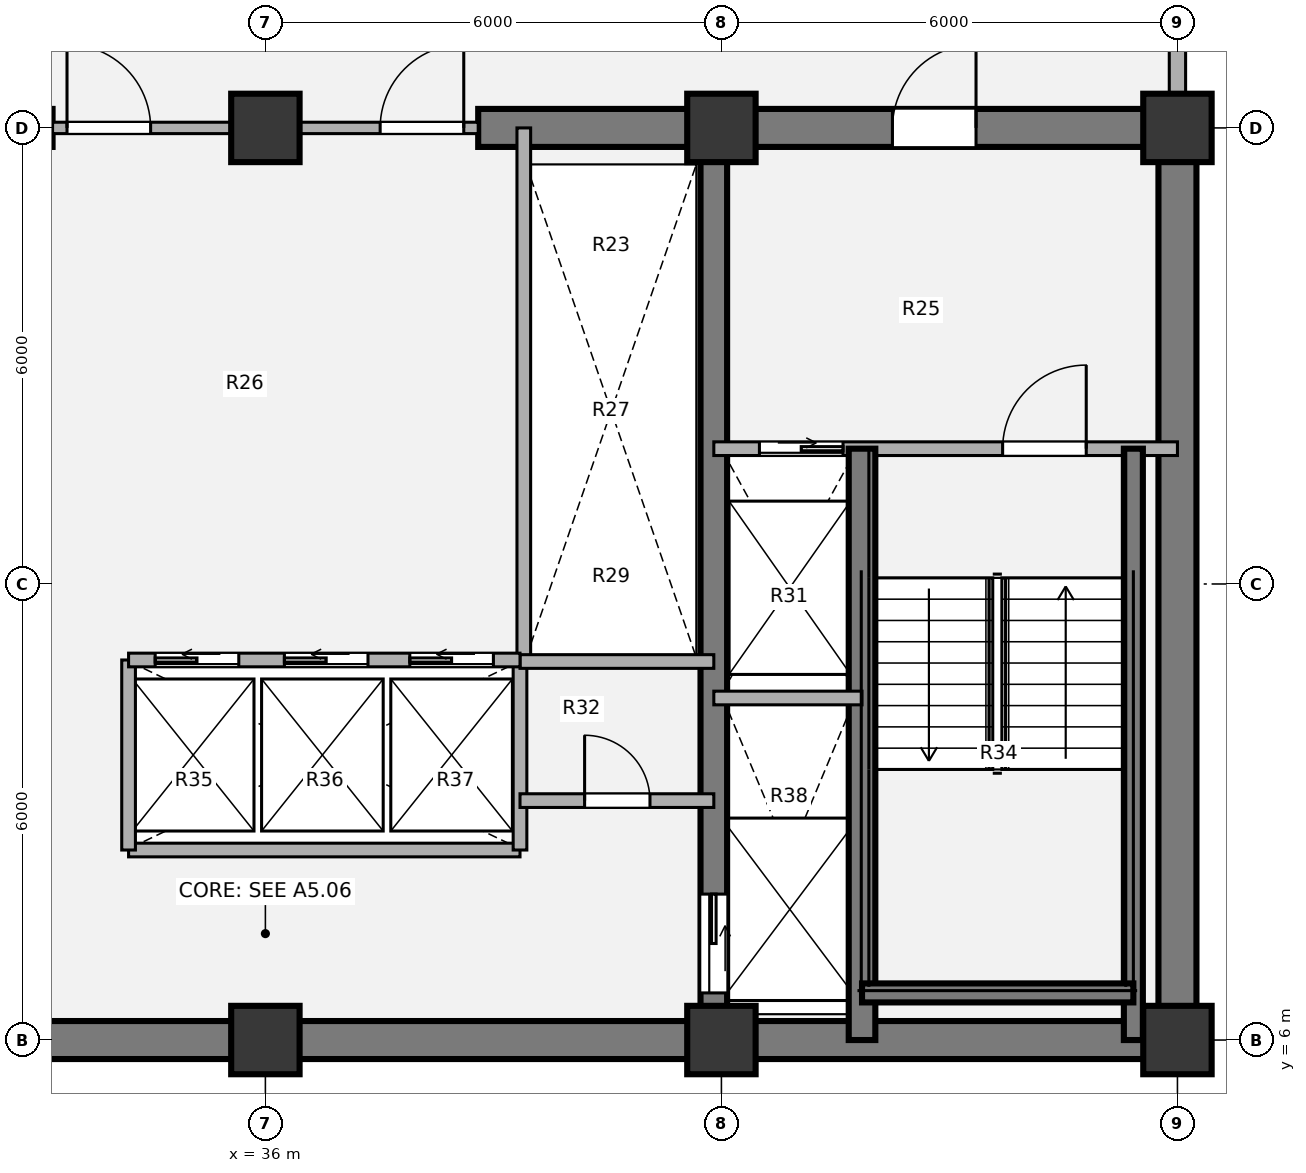
"""IFC4 building model, lengths in metres.
Left out: names, types, materials, properties, quantities, classifications, styles, units other than length and angle.
Written with IfcOpenShell. Run it as: python <this file> out.ifc"""

import sys

from ifc_helpers import new_model, si_unit, direction, frame, frame_2d, origin, origin_2d, place, context, subcontext, project, spatial, rectangle, extrude, source, transform, mapped, element, fill, save


model = new_model("IFC4")
c1 = context("Model", 3, precision=1e-05, world=origin(), true_north=direction((0.0, 1.0)))
c2 = subcontext(c1, "Body", "Model", "MODEL_VIEW")
j1 = project(units=[si_unit("LENGTHUNIT", "METRE"), si_unit("PLANEANGLEUNIT", "RADIAN")], contexts=[c1])
p1 = place(None, origin())
s1 = spatial("IfcSite", under=j1, at=p1, CompositionType="ELEMENT")
p2 = place(p1, origin())
s2 = spatial("IfcBuilding", under=s1, at=p2, CompositionType="ELEMENT")
p3 = place(p2, frame((0.0, 0.0, 97.38)))
s3 = spatial("IfcBuildingStorey", under=s2, at=p3, CompositionType="ELEMENT", Elevation=97.38)
m1 = source(origin(), c2, "Body", "SweptSolid", [
    extrude(rectangle(XDim=0.9, YDim=0.9, at=origin_2d()), origin(), (0.0, 0.0, 1.0), 3.78),
])
for number, where, z_axis, x_axis in (
    (1, (36.0, 6.0, 0.0), (0.0, 0.0, 1.0), (1.0, 0.0, 0.0)),
    (2, (42.0, 6.0, 0.0), (0.0, 0.0, 1.0), (1.0, 0.0, 0.0)),
    (3, (48.0, 6.0, 0.0), (0.0, 0.0, 1.0), (1.0, 0.0, 0.0)),
    (4, (36.0, 18.0, 0.0), (0.0, 0.0, 1.0), (1.0, 0.0, 0.0)),
    (5, (42.0, 18.0, 0.0), (0.0, 0.0, 1.0), (1.0, 0.0, 0.0)),
    (6, (48.0, 18.0, 0.0), (0.0, 0.0, 1.0), (1.0, 0.0, 0.0)),
):
    element("IfcColumn", number, at=place(p3, frame(where, z_axis=z_axis, x_axis=x_axis)), inside=s3, PredefinedType="COLUMN", context=c2, shape_type="MappedRepresentation", body=[
        mapped(m1, transform((0.0, 0.0, 0.0), x_axis=(1.0, 0.0, 0.0), y_axis=(0.0, 1.0, 0.0), z_axis=(0.0, 0.0, 1.0), scale=1.0)),
    ])
p4 = place(p3, frame((48.25, 6.0, 0.0), z_axis=(0.0, 0.0, 1.0), x_axis=(-1.0, 0.0, 0.0)))
e7 = element("IfcWall", 7, at=p4, inside=s3, PredefinedType="SHEAR", context=c2, shape_type="SweptSolid", body=[
    extrude(rectangle(XDim=24.5, YDim=0.5, at=frame_2d((12.25, 0.0))), origin(), (0.0, 0.0, 1.0), 3.78),
])
p5 = place(p3, frame((48.0, 18.0, 0.0), z_axis=(0.0, 0.0, 1.0), x_axis=(0.0, -1.0, 0.0)))
e8 = element("IfcWall", 8, at=p5, inside=s3, PredefinedType="SHEAR", context=c2, shape_type="SweptSolid", body=[
    extrude(rectangle(XDim=12.0, YDim=0.5, at=frame_2d((6.0, 0.0))), origin(), (0.0, 0.0, 1.0), 3.78),
])
p6 = place(p3, frame((23.75, 18.0, 0.0), z_axis=(0.0, 0.0, 1.0), x_axis=(1.0, 0.0, 0.0)))
e9 = element("IfcWall", 9, at=p6, inside=s3, PredefinedType="SHEAR", context=c2, shape_type="SweptSolid", body=[
    extrude(rectangle(XDim=9.45, YDim=0.5, at=frame_2d((4.725, 0.0))), origin(), (0.0, 0.0, 1.0), 3.78),
])
p7 = place(p6, frame((2.95, 0.0, 0.0)))
e10 = element("IfcOpeningElement", 10, at=p7, cuts=e9, PredefinedType="OPENING", context=c2, shape_type="SweptSolid", body=[
    extrude(rectangle(XDim=1.1, YDim=2.1, at=origin_2d()), frame((0.55, 0.26, 1.05), z_axis=(0.0, -1.0, 0.0), x_axis=(1.0, 0.0, 0.0)), (0.0, 0.0, 1.0), 0.52),
])
p8 = place(p3, frame((38.8, 18.0, 0.0), z_axis=(0.0, 0.0, 1.0), x_axis=(1.0, 0.0, 0.0)))
e11 = element("IfcWall", 11, at=p8, inside=s3, PredefinedType="SHEAR", context=c2, shape_type="SweptSolid", body=[
    extrude(rectangle(XDim=9.45, YDim=0.5, at=frame_2d((4.725, 0.0))), origin(), (0.0, 0.0, 1.0), 3.78),
])
p9 = place(p8, frame((5.45, 0.0, 0.0)))
e12 = element("IfcOpeningElement", 12, at=p9, cuts=e11, PredefinedType="OPENING", context=c2, shape_type="SweptSolid", body=[
    extrude(rectangle(XDim=1.1, YDim=2.1, at=origin_2d()), frame((0.55, 0.26, 1.05), z_axis=(0.0, -1.0, 0.0), x_axis=(1.0, 0.0, 0.0)), (0.0, 0.0, 1.0), 0.52),
])
p10 = place(p3, frame((41.9, 18.0, 0.0), z_axis=(0.0, 0.0, 1.0), x_axis=(0.0, -1.0, 0.0)))
e13 = element("IfcWall", 13, at=p10, inside=s3, PredefinedType="SHEAR", context=c2, shape_type="SweptSolid", body=[
    extrude(rectangle(XDim=12.0, YDim=0.35, at=frame_2d((6.0, 0.0))), origin(), (0.0, 0.0, 1.0), 3.78),
])
p11 = place(p10, frame((10.08, 0.0, 0.0)))
e14 = element("IfcOpeningElement", 14, at=p11, cuts=e13, PredefinedType="OPENING", context=c2, shape_type="SweptSolid", body=[
    extrude(rectangle(XDim=1.3, YDim=2.1, at=origin_2d()), frame((0.65, 0.185, 1.05), z_axis=(0.0, -1.0, 0.0), x_axis=(1.0, 0.0, 0.0)), (0.0, 0.0, 1.0), 0.37),
])
p12 = place(p3, frame((48.0, 21.05, 0.0), z_axis=(0.0, 0.0, 1.0), x_axis=(0.0, -1.0, 0.0)))
e15 = element("IfcWall", 15, at=p12, inside=s3, PredefinedType="SOLIDWALL", context=c2, shape_type="SweptSolid", body=[
    extrude(rectangle(XDim=2.62, YDim=0.215, at=frame_2d((1.31, 0.0))), origin(), (0.0, 0.0, 1.0), 3.53),
])
p13 = place(p3, frame((34.2, 8.5, 0.0), z_axis=(0.0, 0.0, 1.0), x_axis=(1.0, 0.0, 0.0)))
e16 = element("IfcWall", 16, at=p13, inside=s3, PredefinedType="PARTITIONING", context=c2, shape_type="SweptSolid", body=[
    extrude(rectangle(XDim=5.15, YDim=0.18, at=frame_2d((2.575, 0.0))), origin(), (0.0, 0.0, 1.0), 3.5),
])
for number, where, z_axis, x_axis in (
    (17, (34.2, 8.5, 0.0), (0.0, 0.0, 1.0), (0.0, 1.0, 0.0)),
    (18, (39.35, 8.5, 0.0), (0.0, 0.0, 1.0), (0.0, 1.0, 0.0)),
):
    element("IfcWall", number, at=place(p3, frame(where, z_axis=z_axis, x_axis=x_axis)), inside=s3, PredefinedType="PARTITIONING", context=c2, shape_type="SweptSolid", body=[
        extrude(rectangle(XDim=2.5, YDim=0.18, at=frame_2d((1.25, 0.0))), origin(), (0.0, 0.0, 1.0), 3.5),
    ])
p14 = place(p3, frame((39.4, 11.0, 0.0), z_axis=(0.0, 0.0, 1.0), x_axis=(0.0, 1.0, 0.0)))
e19 = element("IfcWall", 19, at=p14, inside=s3, PredefinedType="PARTITIONING", context=c2, shape_type="SweptSolid", body=[
    extrude(rectangle(XDim=7.0, YDim=0.18, at=frame_2d((3.5, 0.0))), origin(), (0.0, 0.0, 1.0), 3.5),
])
p15 = place(p3, frame((39.35, 10.98, 0.0), z_axis=(0.0, 0.0, 1.0), x_axis=(1.0, 0.0, 0.0)))
e20 = element("IfcWall", 20, at=p15, inside=s3, PredefinedType="PARTITIONING", context=c2, shape_type="SweptSolid", body=[
    extrude(rectangle(XDim=2.55, YDim=0.18, at=frame_2d((1.275, 0.0))), origin(), (0.0, 0.0, 1.0), 3.5),
])
p16 = place(p3, frame((39.35, 9.15, 0.0), z_axis=(0.0, 0.0, 1.0), x_axis=(1.0, 0.0, 0.0)))
e21 = element("IfcWall", 21, at=p16, inside=s3, PredefinedType="PARTITIONING", context=c2, shape_type="SweptSolid", body=[
    extrude(rectangle(XDim=2.55, YDim=0.18, at=frame_2d((1.275, 0.0))), origin(), (0.0, 0.0, 1.0), 3.5),
])
p17 = place(p16, frame((0.85, 0.0, 0.0)))
e22 = element("IfcOpeningElement", 22, at=p17, cuts=e21, PredefinedType="OPENING", context=c2, shape_type="SweptSolid", body=[
    extrude(rectangle(XDim=0.86, YDim=2.1, at=origin_2d()), frame((0.43, 0.1, 1.05), z_axis=(0.0, -1.0, 0.0), x_axis=(1.0, 0.0, 0.0)), (0.0, 0.0, 1.0), 0.2),
])
p18 = place(p3, frame((33.2, 18.0, 0.0), z_axis=(0.0, 0.0, 1.0), x_axis=(1.0, 0.0, 0.0)))
e23 = element("IfcWall", 23, at=p18, inside=s3, PredefinedType="PARTITIONING", context=c2, shape_type="SweptSolid", body=[
    extrude(rectangle(XDim=5.6, YDim=0.15, at=frame_2d((2.8, 0.0))), origin(), (0.0, 0.0, 1.0), 2.315),
])
p19 = place(p18, frame((0.19, 0.0, 0.0)))
e24 = element("IfcOpeningElement", 24, at=p19, cuts=e23, PredefinedType="OPENING", context=c2, shape_type="SweptSolid", body=[
    extrude(rectangle(XDim=1.1, YDim=2.1, at=origin_2d()), frame((0.55, 0.085, 1.05), z_axis=(0.0, -1.0, 0.0), x_axis=(1.0, 0.0, 0.0)), (0.0, 0.0, 1.0), 0.17),
])
p20 = place(p18, frame((4.31, 0.0, 0.0)))
e25 = element("IfcOpeningElement", 25, at=p20, cuts=e23, PredefinedType="OPENING", context=c2, shape_type="SweptSolid", body=[
    extrude(rectangle(XDim=1.1, YDim=2.1, at=origin_2d()), frame((0.55, 0.085, 1.05), z_axis=(0.0, -1.0, 0.0), x_axis=(1.0, 0.0, 0.0)), (0.0, 0.0, 1.0), 0.17),
])
p21 = place(p3, frame((41.9, 13.78, 0.0), z_axis=(0.0, 0.0, 1.0), x_axis=(1.0, 0.0, 0.0)))
e26 = element("IfcWall", 26, at=p21, inside=s3, PredefinedType="PARTITIONING", context=c2, shape_type="SweptSolid", body=[
    extrude(rectangle(XDim=6.1, YDim=0.18, at=frame_2d((3.05, 0.0))), origin(), (0.0, 0.0, 1.0), 3.5),
])
p22 = place(p21, frame((0.6, 0.0, 0.0)))
e27 = element("IfcOpeningElement", 27, at=p22, cuts=e26, PredefinedType="OPENING", context=c2, shape_type="SweptSolid", body=[
    extrude(rectangle(XDim=1.1, YDim=2.1, at=origin_2d()), frame((0.55, 0.1, 1.05), z_axis=(0.0, -1.0, 0.0), x_axis=(1.0, 0.0, 0.0)), (0.0, 0.0, 1.0), 0.2),
])
p23 = place(p21, frame((3.8, 0.0, 0.0)))
e28 = element("IfcOpeningElement", 28, at=p23, cuts=e26, PredefinedType="OPENING", context=c2, shape_type="SweptSolid", body=[
    extrude(rectangle(XDim=1.1, YDim=2.1, at=origin_2d()), frame((0.55, 0.1, 1.05), z_axis=(0.0, -1.0, 0.0), x_axis=(1.0, 0.0, 0.0)), (0.0, 0.0, 1.0), 0.2),
])
p24 = place(p3, frame((43.85, 6.0, 0.0), z_axis=(0.0, 0.0, 1.0), x_axis=(0.0, 1.0, 0.0)))
e29 = element("IfcWall", 29, at=p24, inside=s3, PredefinedType="SHEAR", context=c2, shape_type="SweptSolid", body=[
    extrude(rectangle(XDim=7.78, YDim=0.35, at=frame_2d((3.89, 0.0))), origin(), (0.0, 0.0, 1.0), 3.85),
])
p25 = place(p3, frame((47.42, 6.0, 0.0), z_axis=(0.0, 0.0, 1.0), x_axis=(0.0, 1.0, 0.0)))
e30 = element("IfcWall", 30, at=p25, inside=s3, PredefinedType="SHEAR", context=c2, shape_type="SweptSolid", body=[
    extrude(rectangle(XDim=7.78, YDim=0.25, at=frame_2d((3.89, 0.0))), origin(), (0.0, 0.0, 1.0), 3.85),
])
p26 = place(p3, frame((43.85, 6.62, 0.0), z_axis=(0.0, 0.0, 1.0), x_axis=(1.0, 0.0, 0.0)))
e31 = element("IfcWall", 31, at=p26, inside=s3, PredefinedType="SHEAR", context=c2, shape_type="SweptSolid", body=[
    extrude(rectangle(XDim=3.57, YDim=0.25, at=frame_2d((1.785, 0.0))), origin(), (0.0, 0.0, 1.0), 3.85),
])
p27 = place(p3, frame((41.9, 10.5, 0.0), z_axis=(0.0, 0.0, 1.0), x_axis=(1.0, 0.0, 0.0)))
e32 = element("IfcWall", 32, at=p27, inside=s3, PredefinedType="PARTITIONING", context=c2, shape_type="SweptSolid", body=[
    extrude(rectangle(XDim=1.95, YDim=0.18, at=frame_2d((0.975, 0.0))), origin(), (0.0, 0.0, 1.0), 3.5),
])
p28 = place(p3, frame((34.2, 11.0, 0.0), z_axis=(0.0, 0.0, 1.0), x_axis=(1.0, 0.0, 0.0)))
e33 = element("IfcWall", 33, at=p28, inside=s3, PredefinedType="PARTITIONING", context=c2, shape_type="SweptSolid", body=[
    extrude(rectangle(XDim=5.15, YDim=0.18, at=frame_2d((2.575, 0.0))), origin(), (0.0, 0.0, 1.0), 3.5),
])
p29 = place(p28, frame((0.35, 0.0, 0.0)))
e34 = element("IfcOpeningElement", 34, at=p29, cuts=e33, PredefinedType="OPENING", context=c2, shape_type="SweptSolid", body=[
    extrude(rectangle(XDim=1.1, YDim=2.1, at=origin_2d()), frame((0.55, 0.1, 1.05), z_axis=(0.0, -1.0, 0.0), x_axis=(1.0, 0.0, 0.0)), (0.0, 0.0, 1.0), 0.2),
])
p30 = place(p28, frame((2.05, 0.0, 0.0)))
e35 = element("IfcOpeningElement", 35, at=p30, cuts=e33, PredefinedType="OPENING", context=c2, shape_type="SweptSolid", body=[
    extrude(rectangle(XDim=1.1, YDim=2.1, at=origin_2d()), frame((0.55, 0.1, 1.05), z_axis=(0.0, -1.0, 0.0), x_axis=(1.0, 0.0, 0.0)), (0.0, 0.0, 1.0), 0.2),
])
p31 = place(p28, frame((3.7, 0.0, 0.0)))
e36 = element("IfcOpeningElement", 36, at=p31, cuts=e33, PredefinedType="OPENING", context=c2, shape_type="SweptSolid", body=[
    extrude(rectangle(XDim=1.1, YDim=2.1, at=origin_2d()), frame((0.55, 0.1, 1.05), z_axis=(0.0, -1.0, 0.0), x_axis=(1.0, 0.0, 0.0)), (0.0, 0.0, 1.0), 0.2),
])
m2 = source(origin(), c2, "Body", "SweptSolid", [
    extrude(rectangle(XDim=0.86, YDim=2.1, at=origin_2d()), frame((0.43, 0.025, 1.05), z_axis=(0.0, -1.0, 0.0), x_axis=(1.0, 0.0, 0.0)), (0.0, 0.0, 1.0), 0.05),
])
p32 = place(p17, origin())
e37 = element("IfcDoor", 37, at=p32, inside=s3, OperationType="SINGLE_SWING_LEFT", PredefinedType="DOOR", context=c2, shape_type="MappedRepresentation", body=[
    mapped(m2, transform((0.0, 0.0, 0.0), x_axis=(1.0, 0.0, 0.0), y_axis=(0.0, 1.0, 0.0), z_axis=(0.0, 0.0, 1.0), scale=1.0)),
])
fill(e22, e37)
m3 = source(origin(), c2, "Body", "SweptSolid", [
    extrude(rectangle(XDim=1.1, YDim=2.1, at=origin_2d()), frame((0.55, 0.025, 1.05), z_axis=(0.0, -1.0, 0.0), x_axis=(1.0, 0.0, 0.0)), (0.0, 0.0, 1.0), 0.05),
])
p33 = place(p19, origin())
e38 = element("IfcDoor", 38, at=p33, inside=s3, OperationType="SINGLE_SWING_LEFT", PredefinedType="DOOR", context=c2, shape_type="MappedRepresentation", body=[
    mapped(m3, transform((0.0, 0.0, 0.0), x_axis=(1.0, 0.0, 0.0), y_axis=(0.0, 1.0, 0.0), z_axis=(0.0, 0.0, 1.0), scale=1.0)),
])
fill(e24, e38)
p34 = place(p20, origin())
e39 = element("IfcDoor", 39, at=p34, inside=s3, OperationType="SINGLE_SWING_RIGHT", PredefinedType="DOOR", context=c2, shape_type="MappedRepresentation", body=[
    mapped(m3, transform((0.0, 0.0, 0.0), x_axis=(1.0, 0.0, 0.0), y_axis=(0.0, 1.0, 0.0), z_axis=(0.0, 0.0, 1.0), scale=1.0)),
])
fill(e25, e39)
m4 = source(origin(), c2, "Body", "SweptSolid", [
    extrude(rectangle(XDim=1.1, YDim=2.1, at=origin_2d()), frame((0.55, 0.025, 1.05), z_axis=(0.0, -1.0, 0.0), x_axis=(1.0, 0.0, 0.0)), (0.0, 0.0, 1.0), 0.05),
])
p35 = place(p22, origin())
e40 = element("IfcDoor", 40, at=p35, inside=s3, OperationType="SLIDING_TO_RIGHT", PredefinedType="DOOR", context=c2, shape_type="MappedRepresentation", body=[
    mapped(m4, transform((0.0, 0.0, 0.0), x_axis=(1.0, 0.0, 0.0), y_axis=(0.0, 1.0, 0.0), z_axis=(0.0, 0.0, 1.0), scale=1.0)),
])
fill(e27, e40)
m5 = source(origin(), c2, "Body", "SweptSolid", [
    extrude(rectangle(XDim=1.1, YDim=2.1, at=origin_2d()), frame((0.55, 0.025, 1.05), z_axis=(0.0, -1.0, 0.0), x_axis=(1.0, 0.0, 0.0)), (0.0, 0.0, 1.0), 0.05),
])
p36 = place(p23, origin())
e41 = element("IfcDoor", 41, at=p36, inside=s3, OperationType="SINGLE_SWING_RIGHT", PredefinedType="DOOR", context=c2, shape_type="MappedRepresentation", body=[
    mapped(m5, transform((0.0, 0.0, 0.0), x_axis=(1.0, 0.0, 0.0), y_axis=(0.0, 1.0, 0.0), z_axis=(0.0, 0.0, 1.0), scale=1.0)),
])
fill(e28, e41)
m6 = source(origin(), c2, "Body", "SweptSolid", [
    extrude(rectangle(XDim=1.3, YDim=2.1, at=origin_2d()), frame((0.65, 0.025, 1.05), z_axis=(0.0, -1.0, 0.0), x_axis=(1.0, 0.0, 0.0)), (0.0, 0.0, 1.0), 0.05),
])
p37 = place(p11, origin())
e42 = element("IfcDoor", 42, at=p37, inside=s3, OperationType="SLIDING_TO_LEFT", PredefinedType="DOOR", context=c2, shape_type="MappedRepresentation", body=[
    mapped(m6, transform((0.0, 0.0, 0.0), x_axis=(1.0, 0.0, 0.0), y_axis=(0.0, 1.0, 0.0), z_axis=(0.0, 0.0, 1.0), scale=1.0)),
])
fill(e14, e42)
p38 = place(p9, origin())
e43 = element("IfcDoor", 43, at=p38, inside=s3, OperationType="SINGLE_SWING_RIGHT", PredefinedType="DOOR", context=c2, shape_type="MappedRepresentation", body=[
    mapped(m3, transform((0.0, 0.0, 0.0), x_axis=(1.0, 0.0, 0.0), y_axis=(0.0, 1.0, 0.0), z_axis=(0.0, 0.0, 1.0), scale=1.0)),
])
fill(e12, e43)
p39 = place(p29, origin())
e44 = element("IfcDoor", 44, at=p39, inside=s3, OperationType="SLIDING_TO_LEFT", PredefinedType="DOOR", context=c2, shape_type="MappedRepresentation", body=[
    mapped(m4, transform((0.0, 0.0, 0.0), x_axis=(1.0, 0.0, 0.0), y_axis=(0.0, 1.0, 0.0), z_axis=(0.0, 0.0, 1.0), scale=1.0)),
])
fill(e34, e44)
p40 = place(p30, origin())
e45 = element("IfcDoor", 45, at=p40, inside=s3, OperationType="SLIDING_TO_LEFT", PredefinedType="DOOR", context=c2, shape_type="MappedRepresentation", body=[
    mapped(m4, transform((0.0, 0.0, 0.0), x_axis=(1.0, 0.0, 0.0), y_axis=(0.0, 1.0, 0.0), z_axis=(0.0, 0.0, 1.0), scale=1.0)),
])
fill(e35, e45)
p41 = place(p31, origin())
e46 = element("IfcDoor", 46, at=p41, inside=s3, OperationType="SLIDING_TO_LEFT", PredefinedType="DOOR", context=c2, shape_type="MappedRepresentation", body=[
    mapped(m4, transform((0.0, 0.0, 0.0), x_axis=(1.0, 0.0, 0.0), y_axis=(0.0, 1.0, 0.0), z_axis=(0.0, 0.0, 1.0), scale=1.0)),
])
fill(e36, e46)
save(model, sys.argv[1])
